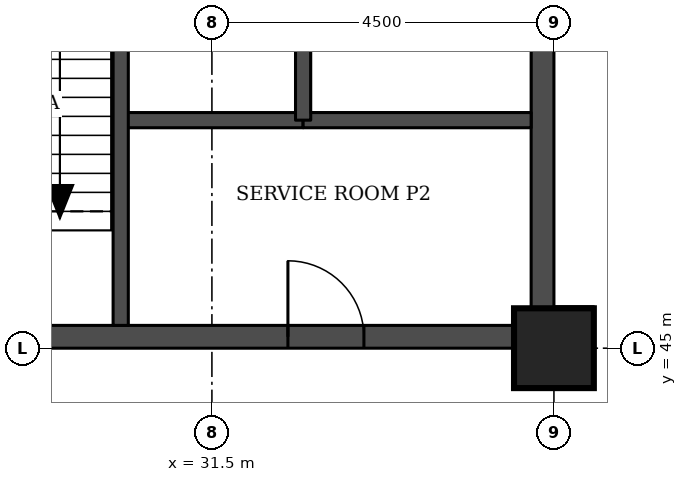
"""IFC4 building model, lengths in metres.
Left out: names, types, materials, properties, quantities, classifications, styles, units other than length and angle.
Written with IfcOpenShell. Run it as: python <this file> out.ifc"""

import sys

from ifc_helpers import new_model, si_unit, direction, frame, frame_2d, origin, origin_2d, place, context, subcontext, project, spatial, rectangle, extrude, element, fill, save


model = new_model("IFC4")
c1 = context("Model", 3, precision=1e-05, world=origin(), true_north=direction((0.0, 1.0)))
c2 = subcontext(c1, "Body", "Model", "MODEL_VIEW")
j1 = project(units=[si_unit("LENGTHUNIT", "METRE"), si_unit("PLANEANGLEUNIT", "RADIAN")], contexts=[c1])
p1 = place(None, origin())
s1 = spatial("IfcSite", under=j1, at=p1, CompositionType="ELEMENT")
p2 = place(p1, origin())
s2 = spatial("IfcBuilding", under=s1, at=p2, CompositionType="ELEMENT")
p3 = place(p2, frame((0.0, 0.0, 130.7)))
s3 = spatial("IfcBuildingStorey", under=s2, at=p3, CompositionType="ELEMENT", Elevation=130.7)
p4 = place(p3, frame((36.0, 45.0, 0.0), z_axis=(0.0, 0.0, 1.0), x_axis=(1.0, 0.0, 0.0)))
e1 = element("IfcColumn", 1, at=p4, inside=s3, PredefinedType="COLUMN", context=c2, shape_type="SweptSolid", body=[
    extrude(rectangle(XDim=1.05, YDim=1.05, at=origin_2d()), origin(), (0.0, 0.0, 1.0), 3.7),
])
p5 = place(p3, frame((27.3, 45.15, 0.0), z_axis=(0.0, 0.0, 1.0), x_axis=(1.0, 0.0, 0.0)))
e2 = element("IfcWall", 2, at=p5, inside=s3, PredefinedType="SHEAR", context=c2, shape_type="SweptSolid", body=[
    extrude(rectangle(XDim=8.4, YDim=0.3, at=frame_2d((4.2, 0.0))), origin(), (0.0, 0.0, 1.0), 3.7),
])
p6 = place(p5, frame((5.2, 0.0, 0.0)))
e3 = element("IfcOpeningElement", 3, at=p6, cuts=e2, PredefinedType="OPENING", context=c2, shape_type="SweptSolid", body=[
    extrude(rectangle(XDim=1.0, YDim=2.1, at=frame_2d((0.5, 1.05))), frame((0.0, 0.16, 0.0), z_axis=(0.0, -1.0, 0.0), x_axis=(1.0, 0.0, 0.0)), (0.0, 0.0, 1.0), 0.32),
])
p7 = place(p3, frame((35.85, 45.0, 0.0), z_axis=(0.0, 0.0, 1.0), x_axis=(0.0, 1.0, 0.0)))
e4 = element("IfcWall", 4, at=p7, inside=s3, PredefinedType="SHEAR", context=c2, shape_type="SweptSolid", body=[
    extrude(rectangle(XDim=9.0, YDim=0.3, at=frame_2d((4.5, 0.0))), origin(), (0.0, 0.0, 1.0), 3.7),
])
p8 = place(p3, frame((30.3, 48.0, 0.0), z_axis=(0.0, 0.0, 1.0), x_axis=(1.0, 0.0, 0.0)))
e5 = element("IfcWall", 5, at=p8, inside=s3, PredefinedType="SOLIDWALL", context=c2, shape_type="SweptSolid", body=[
    extrude(rectangle(XDim=2.4, YDim=0.2, at=frame_2d((1.2, 0.0))), origin(), (0.0, 0.0, 1.0), 3.55),
])
p9 = place(p3, frame((32.7, 48.0, 0.0), z_axis=(0.0, 0.0, 1.0), x_axis=(1.0, 0.0, 0.0)))
e6 = element("IfcWall", 6, at=p9, inside=s3, PredefinedType="SOLIDWALL", context=c2, shape_type="SweptSolid", body=[
    extrude(rectangle(XDim=3.0, YDim=0.2, at=frame_2d((1.5, 0.0))), origin(), (0.0, 0.0, 1.0), 3.55),
])
for number, where, z_axis, x_axis in (
    (7, (30.3, 45.3, 0.0), (0.0, 0.0, 1.0), (0.0, 1.0, 0.0)),
    (8, (32.7, 48.0, 0.0), (0.0, 0.0, 1.0), (0.0, 1.0, 0.0)),
):
    element("IfcWall", number, at=place(p3, frame(where, z_axis=z_axis, x_axis=x_axis)), inside=s3, PredefinedType="SOLIDWALL", context=c2, shape_type="SweptSolid", body=[
        extrude(rectangle(XDim=5.7, YDim=0.2, at=frame_2d((2.85, 0.0))), origin(), (0.0, 0.0, 1.0), 3.55),
    ])
p10 = place(p6, origin())
e9 = element("IfcDoor", 9, at=p10, inside=s3, OperationType="SINGLE_SWING_LEFT", PredefinedType="DOOR", context=c2, shape_type="SweptSolid", body=[
    extrude(rectangle(XDim=1.0, YDim=2.1, at=frame_2d((0.5, 1.05))), frame((0.0, 0.025, 0.0), z_axis=(0.0, -1.0, 0.0), x_axis=(1.0, 0.0, 0.0)), (0.0, 0.0, 1.0), 0.05),
])
fill(e3, e9)
save(model, sys.argv[1])
